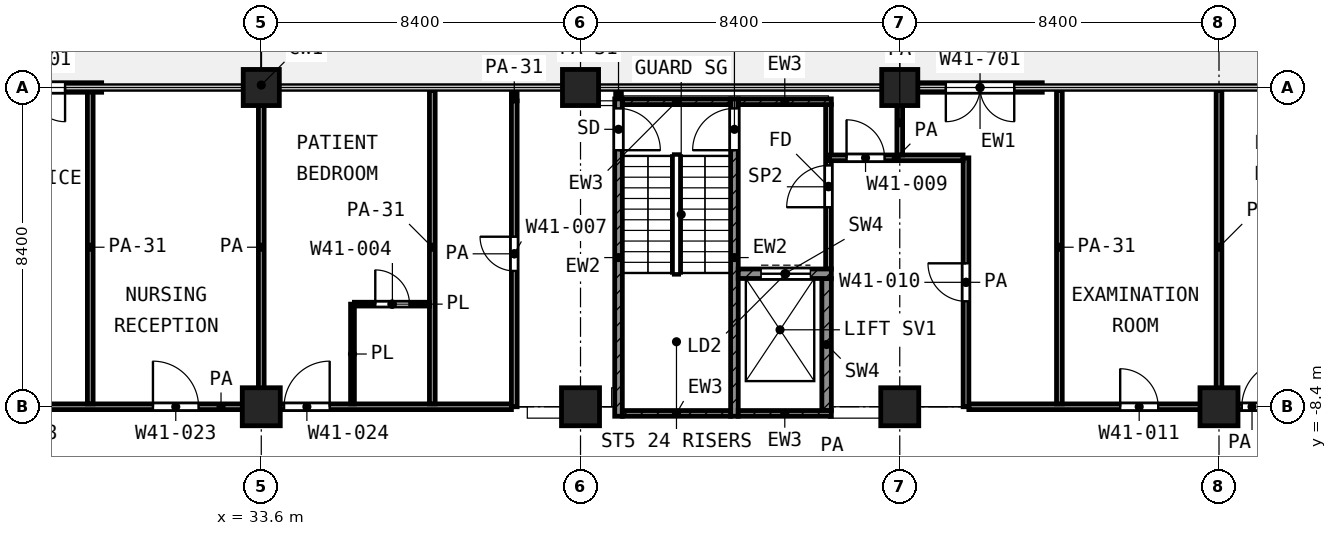
"""IFC4 building model, lengths in metres.
Left out: names, types, materials, properties, quantities, classifications, styles, units other than length and angle.
Written with IfcOpenShell. Run it as: python <this file> out.ifc"""

import sys

from ifc_helpers import new_model, si_unit, direction, frame, frame_2d, origin, origin_2d, place, context, subcontext, project, spatial, rectangle, extrude, element, fill, save


model = new_model("IFC4")
c1 = context("Model", 3, precision=1e-05, world=origin(), true_north=direction((0.0, 1.0)))
c2 = subcontext(c1, "Body", "Model", "MODEL_VIEW")
j1 = project(units=[si_unit("LENGTHUNIT", "METRE"), si_unit("PLANEANGLEUNIT", "RADIAN")], contexts=[c1])
p1 = place(None, origin())
s1 = spatial("IfcSite", under=j1, at=p1, CompositionType="ELEMENT")
p2 = place(p1, origin())
s2 = spatial("IfcBuilding", under=s1, at=p2, CompositionType="ELEMENT")
p3 = place(p2, frame((0.0, 0.0, 179.4)))
s3 = spatial("IfcBuildingStorey", under=s2, at=p3, CompositionType="ELEMENT", Elevation=179.4)
for number, where, z_axis, x_axis in (
    (1, (33.6, 0.0, 0.0), (0.0, 0.0, 1.0), (1.0, 0.0, 0.0)),
    (2, (42.0, 0.0, 0.0), (0.0, 0.0, 1.0), (1.0, 0.0, 0.0)),
    (3, (50.4, 0.0, 0.0), (0.0, 0.0, 1.0), (1.0, 0.0, 0.0)),
):
    element("IfcColumn", number, at=place(p3, frame(where, z_axis=z_axis, x_axis=x_axis)), inside=s3, PredefinedType="COLUMN", context=c2, shape_type="SweptSolid", body=[
        extrude(rectangle(XDim=0.95, YDim=0.95, at=origin_2d()), origin(), (0.0, 0.0, 1.0), 4.2),
    ])
for number, where, z_axis, x_axis in (
    (4, (33.6, -8.4, 0.0), (0.0, 0.0, 1.0), (1.0, 0.0, 0.0)),
    (5, (42.0, -8.4, 0.0), (0.0, 0.0, 1.0), (1.0, 0.0, 0.0)),
    (6, (50.4, -8.4, 0.0), (0.0, 0.0, 1.0), (1.0, 0.0, 0.0)),
    (7, (58.8, -8.4, 0.0), (0.0, 0.0, 1.0), (1.0, 0.0, 0.0)),
):
    element("IfcColumn", number, at=place(p3, frame(where, z_axis=z_axis, x_axis=x_axis)), inside=s3, PredefinedType="COLUMN", context=c2, shape_type="SweptSolid", body=[
        extrude(rectangle(XDim=1.0, YDim=1.0, at=origin_2d()), origin(), (0.0, 0.0, 1.0), 4.2),
    ])
p4 = place(p3, frame((54.15, 0.0, 0.0), z_axis=(0.0, 0.0, 1.0), x_axis=(-1.0, 0.0, 0.0)))
e8 = element("IfcWall", 8, at=p4, inside=s3, PredefinedType="SOLIDWALL", context=c2, shape_type="SweptSolid", body=[
    extrude(rectangle(XDim=3.275, YDim=0.25, at=frame_2d((1.637, 0.0))), origin(), (0.0, 0.0, 1.0), 2.58),
])
p5 = place(p4, frame((0.738, 0.0, 0.0)))
e9 = element("IfcOpeningElement", 9, at=p5, cuts=e8, PredefinedType="OPENING", context=c2, shape_type="SweptSolid", body=[
    extrude(rectangle(XDim=1.8, YDim=2.1, at=frame_2d((0.9, 1.05))), frame((0.0, 0.135, 0.0), z_axis=(0.0, -1.0, 0.0), x_axis=(1.0, 0.0, 0.0)), (0.0, 0.0, 1.0), 0.27),
])
p6 = place(p3, frame((29.4, 0.0, 0.0), z_axis=(0.0, 0.0, 1.0), x_axis=(-1.0, 0.0, 0.0)))
e10 = element("IfcWall", 10, at=p6, inside=s3, PredefinedType="SOLIDWALL", context=c2, shape_type="SweptSolid", body=[
    extrude(rectangle(XDim=3.725, YDim=0.25, at=frame_2d((1.862, 0.0))), origin(), (0.0, 0.0, 1.0), 2.58),
])
p7 = place(p6, frame((0.962, 0.0, 0.0)))
e11 = element("IfcOpeningElement", 11, at=p7, cuts=e10, PredefinedType="OPENING", context=c2, shape_type="SweptSolid", body=[
    extrude(rectangle(XDim=1.8, YDim=2.1, at=frame_2d((0.9, 1.05))), frame((0.0, 0.135, 0.0), z_axis=(0.0, -1.0, 0.0), x_axis=(1.0, 0.0, 0.0)), (0.0, 0.0, 1.0), 0.27),
])
p8 = place(p3, frame((43.0, -8.65, 0.0), z_axis=(0.0, 0.0, 1.0), x_axis=(0.0, 1.0, 0.0)))
e12 = element("IfcWall", 12, at=p8, inside=s3, PredefinedType="SHEAR", context=c2, shape_type="SweptSolid", body=[
    extrude(rectangle(XDim=8.35, YDim=0.2, at=frame_2d((4.175, 0.0))), origin(), (0.0, 0.0, 1.0), 3.6),
])
p9 = place(p8, frame((7.0, 0.0, 0.0)))
e13 = element("IfcOpeningElement", 13, at=p9, cuts=e12, PredefinedType="OPENING", context=c2, shape_type="SweptSolid", body=[
    extrude(rectangle(XDim=1.1, YDim=2.1, at=frame_2d((0.55, 1.05))), frame((0.0, 0.11, 0.0), z_axis=(0.0, -1.0, 0.0), x_axis=(1.0, 0.0, 0.0)), (0.0, 0.0, 1.0), 0.22),
])
p10 = place(p3, frame((46.05, -8.65, 0.0), z_axis=(0.0, 0.0, 1.0), x_axis=(0.0, 1.0, 0.0)))
e14 = element("IfcWall", 14, at=p10, inside=s3, PredefinedType="SHEAR", context=c2, shape_type="SweptSolid", body=[
    extrude(rectangle(XDim=8.35, YDim=0.2, at=frame_2d((4.175, 0.0))), origin(), (0.0, 0.0, 1.0), 3.6),
])
p11 = place(p10, frame((7.0, 0.0, 0.0)))
e15 = element("IfcOpeningElement", 15, at=p11, cuts=e14, PredefinedType="OPENING", context=c2, shape_type="SweptSolid", body=[
    extrude(rectangle(XDim=1.1, YDim=2.1, at=frame_2d((0.55, 1.05))), frame((0.0, 0.11, 0.0), z_axis=(0.0, -1.0, 0.0), x_axis=(1.0, 0.0, 0.0)), (0.0, 0.0, 1.0), 0.22),
])
p12 = place(p3, frame((43.1, -0.375, 0.0), z_axis=(0.0, 0.0, 1.0), x_axis=(1.0, 0.0, 0.0)))
e16 = element("IfcWall", 16, at=p12, inside=s3, PredefinedType="SHEAR", context=c2, shape_type="SweptSolid", body=[
    extrude(rectangle(XDim=2.85, YDim=0.15, at=frame_2d((1.425, 0.0))), origin(), (0.0, 0.0, 1.0), 3.6),
])
p13 = place(p3, frame((46.15, -0.375, 0.0), z_axis=(0.0, 0.0, 1.0), x_axis=(1.0, 0.0, 0.0)))
e17 = element("IfcWall", 17, at=p13, inside=s3, PredefinedType="SHEAR", context=c2, shape_type="SweptSolid", body=[
    extrude(rectangle(XDim=2.45, YDim=0.15, at=frame_2d((1.225, 0.0))), origin(), (0.0, 0.0, 1.0), 3.6),
])
p14 = place(p3, frame((43.1, -8.575, 0.0), z_axis=(0.0, 0.0, 1.0), x_axis=(1.0, 0.0, 0.0)))
e18 = element("IfcWall", 18, at=p14, inside=s3, PredefinedType="SHEAR", context=c2, shape_type="SweptSolid", body=[
    extrude(rectangle(XDim=2.85, YDim=0.15, at=frame_2d((1.425, 0.0))), origin(), (0.0, 0.0, 1.0), 3.6),
])
p15 = place(p3, frame((46.15, -8.575, 0.0), z_axis=(0.0, 0.0, 1.0), x_axis=(1.0, 0.0, 0.0)))
e19 = element("IfcWall", 19, at=p15, inside=s3, PredefinedType="SHEAR", context=c2, shape_type="SweptSolid", body=[
    extrude(rectangle(XDim=2.45, YDim=0.15, at=frame_2d((1.225, 0.0))), origin(), (0.0, 0.0, 1.0), 3.6),
])
p16 = place(p3, frame((46.15, -4.9, 0.0), z_axis=(0.0, 0.0, 1.0), x_axis=(1.0, 0.0, 0.0)))
e20 = element("IfcWall", 20, at=p16, inside=s3, PredefinedType="SHEAR", context=c2, shape_type="SweptSolid", body=[
    extrude(rectangle(XDim=2.45, YDim=0.25, at=frame_2d((1.225, 0.0))), origin(), (0.0, 0.0, 1.0), 3.6),
])
p17 = place(p16, frame((0.6, 0.0, 0.0)))
e21 = element("IfcOpeningElement", 21, at=p17, cuts=e20, PredefinedType="OPENING", context=c2, shape_type="SweptSolid", body=[
    extrude(rectangle(XDim=1.3, YDim=2.1, at=frame_2d((0.65, 1.05))), frame((0.0, 0.135, 0.0), z_axis=(0.0, -1.0, 0.0), x_axis=(1.0, 0.0, 0.0)), (0.0, 0.0, 1.0), 0.27),
])
p18 = place(p3, frame((48.475, -8.5, 0.0), z_axis=(0.0, 0.0, 1.0), x_axis=(0.0, 1.0, 0.0)))
e22 = element("IfcWall", 22, at=p18, inside=s3, PredefinedType="SHEAR", context=c2, shape_type="SweptSolid", body=[
    extrude(rectangle(XDim=3.475, YDim=0.25, at=frame_2d((1.738, 0.0))), origin(), (0.0, 0.0, 1.0), 3.6),
])
p19 = place(p3, frame((48.525, -4.775, 0.0), z_axis=(0.0, 0.0, 1.0), x_axis=(0.0, 1.0, 0.0)))
e23 = element("IfcWall", 23, at=p19, inside=s3, PredefinedType="PARTITIONING", context=c2, shape_type="SweptSolid", body=[
    extrude(rectangle(XDim=4.325, YDim=0.15, at=frame_2d((2.163, 0.0))), origin(), (0.0, 0.0, 1.0), 3.6),
])
p20 = place(p19, frame((1.625, 0.0, 0.0)))
e24 = element("IfcOpeningElement", 24, at=p20, cuts=e23, PredefinedType="OPENING", context=c2, shape_type="SweptSolid", body=[
    extrude(rectangle(XDim=1.1, YDim=2.1, at=frame_2d((0.55, 1.05))), frame((0.0, 0.085, 0.0), z_axis=(0.0, -1.0, 0.0), x_axis=(1.0, 0.0, 0.0)), (0.0, 0.0, 1.0), 0.17),
])
p21 = place(p3, frame((36.05, -5.7, 0.0), z_axis=(0.0, 0.0, 1.0), x_axis=(1.0, 0.0, 0.0)))
e25 = element("IfcWall", 25, at=p21, inside=s3, PredefinedType="PARTITIONING", context=c2, shape_type="SweptSolid", body=[
    extrude(rectangle(XDim=1.975, YDim=0.1, at=frame_2d((0.987, 0.0))), origin(), (0.0, 0.0, 1.0), 3.6),
])
p22 = place(p21, frame((0.55, 0.0, 0.0)))
e26 = element("IfcOpeningElement", 26, at=p22, cuts=e25, PredefinedType="OPENING", context=c2, shape_type="SweptSolid", body=[
    extrude(rectangle(XDim=0.9, YDim=2.1, at=frame_2d((0.45, 1.05))), frame((0.0, 0.06, 0.0), z_axis=(0.0, -1.0, 0.0), x_axis=(1.0, 0.0, 0.0)), (0.0, 0.0, 1.0), 0.12),
])
p23 = place(p3, frame((36.0, -8.325, 0.0), z_axis=(0.0, 0.0, 1.0), x_axis=(0.0, 1.0, 0.0)))
e27 = element("IfcWall", 27, at=p23, inside=s3, PredefinedType="PARTITIONING", context=c2, shape_type="SweptSolid", body=[
    extrude(rectangle(XDim=2.625, YDim=0.1, at=frame_2d((1.312, 0.0))), origin(), (0.0, 0.0, 1.0), 3.6),
])
p24 = place(p3, frame((24.9, -8.4, 0.0), z_axis=(0.0, 0.0, 1.0), x_axis=(1.0, 0.0, 0.0)))
e28 = element("IfcWall", 28, at=p24, inside=s3, PredefinedType="PARTITIONING", context=c2, shape_type="SweptSolid", body=[
    extrude(rectangle(XDim=15.282, YDim=0.15, at=frame_2d((7.641, 0.0))), origin(), (0.0, 0.0, 1.0), 3.6),
])
p25 = place(p24, frame((1.75, 0.0, 0.0)))
e29 = element("IfcOpeningElement", 29, at=p25, cuts=e28, PredefinedType="OPENING", context=c2, shape_type="SweptSolid", body=[
    extrude(rectangle(XDim=1.0, YDim=2.1, at=frame_2d((0.5, 1.05))), frame((0.0, 0.085, 0.0), z_axis=(0.0, -1.0, 0.0), x_axis=(1.0, 0.0, 0.0)), (0.0, 0.0, 1.0), 0.17),
])
p26 = place(p24, frame((5.85, 0.0, 0.0)))
e30 = element("IfcOpeningElement", 30, at=p26, cuts=e28, PredefinedType="OPENING", context=c2, shape_type="SweptSolid", body=[
    extrude(rectangle(XDim=1.2, YDim=2.1, at=frame_2d((0.6, 1.05))), frame((0.0, 0.085, 0.0), z_axis=(0.0, -1.0, 0.0), x_axis=(1.0, 0.0, 0.0)), (0.0, 0.0, 1.0), 0.17),
])
p27 = place(p24, frame((9.3, 0.0, 0.0)))
e31 = element("IfcOpeningElement", 31, at=p27, cuts=e28, PredefinedType="OPENING", context=c2, shape_type="SweptSolid", body=[
    extrude(rectangle(XDim=1.2, YDim=2.1, at=frame_2d((0.6, 1.05))), frame((0.0, 0.085, 0.0), z_axis=(0.0, -1.0, 0.0), x_axis=(1.0, 0.0, 0.0)), (0.0, 0.0, 1.0), 0.17),
])
p28 = place(p3, frame((52.218, -8.4, 0.0), z_axis=(0.0, 0.0, 1.0), x_axis=(1.0, 0.0, 0.0)))
e32 = element("IfcWall", 32, at=p28, inside=s3, PredefinedType="PARTITIONING", context=c2, shape_type="SweptSolid", body=[
    extrude(rectangle(XDim=14.902, YDim=0.15, at=frame_2d((7.451, 0.0))), origin(), (0.0, 0.0, 1.0), 3.6),
])
p29 = place(p28, frame((3.982, 0.0, 0.0)))
e33 = element("IfcOpeningElement", 33, at=p29, cuts=e32, PredefinedType="OPENING", context=c2, shape_type="SweptSolid", body=[
    extrude(rectangle(XDim=1.0, YDim=2.1, at=frame_2d((0.5, 1.05))), frame((0.0, 0.085, 0.0), z_axis=(0.0, -1.0, 0.0), x_axis=(1.0, 0.0, 0.0)), (0.0, 0.0, 1.0), 0.17),
])
p30 = place(p28, frame((7.182, 0.0, 0.0)))
e34 = element("IfcOpeningElement", 34, at=p30, cuts=e32, PredefinedType="OPENING", context=c2, shape_type="SweptSolid", body=[
    extrude(rectangle(XDim=1.2, YDim=2.1, at=frame_2d((0.6, 1.05))), frame((0.0, 0.085, 0.0), z_axis=(0.0, -1.0, 0.0), x_axis=(1.0, 0.0, 0.0)), (0.0, 0.0, 1.0), 0.17),
])
p31 = place(p28, frame((12.682, 0.0, 0.0)))
e35 = element("IfcOpeningElement", 35, at=p31, cuts=e32, PredefinedType="OPENING", context=c2, shape_type="SweptSolid", body=[
    extrude(rectangle(XDim=1.0, YDim=2.1, at=frame_2d((0.5, 1.05))), frame((0.0, 0.085, 0.0), z_axis=(0.0, -1.0, 0.0), x_axis=(1.0, 0.0, 0.0)), (0.0, 0.0, 1.0), 0.17),
])
p32 = place(p3, frame((48.55, -1.85, 0.0), z_axis=(0.0, 0.0, 1.0), x_axis=(1.0, 0.0, 0.0)))
e36 = element("IfcWall", 36, at=p32, inside=s3, PredefinedType="PARTITIONING", context=c2, shape_type="SweptSolid", body=[
    extrude(rectangle(XDim=3.516, YDim=0.15, at=frame_2d((1.758, 0.0))), origin(), (0.0, 0.0, 1.0), 3.6),
])
p33 = place(p32, frame((0.45, 0.0, 0.0)))
e37 = element("IfcOpeningElement", 37, at=p33, cuts=e36, PredefinedType="OPENING", context=c2, shape_type="SweptSolid", body=[
    extrude(rectangle(XDim=1.0, YDim=2.1, at=frame_2d((0.5, 1.05))), frame((0.0, 0.085, 0.0), z_axis=(0.0, -1.0, 0.0), x_axis=(1.0, 0.0, 0.0)), (0.0, 0.0, 1.0), 0.17),
])
p34 = place(p3, frame((29.1, -8.325, 0.0), z_axis=(0.0, 0.0, 1.0), x_axis=(0.0, 1.0, 0.0)))
e38 = element("IfcWall", 38, at=p34, inside=s3, PredefinedType="PARTITIONING", context=c2, shape_type="SweptSolid", body=[
    extrude(rectangle(XDim=8.245, YDim=0.15, at=frame_2d((4.123, 0.0))), origin(), (0.0, 0.0, 1.0), 2.7),
])
p35 = place(p3, frame((33.6, -8.325, 0.0), z_axis=(0.0, 0.0, 1.0), x_axis=(0.0, 1.0, 0.0)))
e39 = element("IfcWall", 39, at=p35, inside=s3, PredefinedType="PARTITIONING", context=c2, shape_type="SweptSolid", body=[
    extrude(rectangle(XDim=8.245, YDim=0.15, at=frame_2d((4.123, 0.0))), origin(), (0.0, 0.0, 1.0), 3.6),
])
p36 = place(p3, frame((38.1, -8.325, 0.0), z_axis=(0.0, 0.0, 1.0), x_axis=(0.0, 1.0, 0.0)))
e40 = element("IfcWall", 40, at=p36, inside=s3, PredefinedType="PARTITIONING", context=c2, shape_type="SweptSolid", body=[
    extrude(rectangle(XDim=8.245, YDim=0.15, at=frame_2d((4.123, 0.0))), origin(), (0.0, 0.0, 1.0), 2.7),
])
p37 = place(p3, frame((40.257, -8.4, 0.0), z_axis=(0.0, 0.0, 1.0), x_axis=(0.0, 1.0, 0.0)))
e41 = element("IfcWall", 41, at=p37, inside=s3, PredefinedType="PARTITIONING", context=c2, shape_type="SweptSolid", body=[
    extrude(rectangle(XDim=8.048, YDim=0.15, at=frame_2d((4.024, 0.0))), origin(), (0.0, 0.0, 1.0), 3.6),
])
p38 = place(p37, frame((3.574, 0.0, 0.0)))
e42 = element("IfcOpeningElement", 42, at=p38, cuts=e41, PredefinedType="OPENING", context=c2, shape_type="SweptSolid", body=[
    extrude(rectangle(XDim=0.9, YDim=2.1, at=frame_2d((0.45, 1.05))), frame((0.0, 0.085, 0.0), z_axis=(0.0, -1.0, 0.0), x_axis=(1.0, 0.0, 0.0)), (0.0, 0.0, 1.0), 0.17),
])
p39 = place(p3, frame((40.257, -0.35, 0.0), z_axis=(0.0, 0.0, 1.0), x_axis=(0.0, 1.0, 0.0)))
e43 = element("IfcWall", 43, at=p39, inside=s3, PredefinedType="PARTITIONING", context=c2, shape_type="SweptSolid", body=[
    extrude(rectangle(XDim=0.27, YDim=0.15, at=frame_2d((0.135, 0.0))), origin(), (0.0, 0.0, 1.0), 2.7),
])
p40 = place(p3, frame((43.0, -0.27, 0.0), z_axis=(0.0, 0.0, 1.0), x_axis=(0.0, 1.0, 0.0)))
e44 = element("IfcWall", 44, at=p40, inside=s3, PredefinedType="PARTITIONING", context=c2, shape_type="SweptSolid", body=[
    extrude(rectangle(XDim=0.19, YDim=0.15, at=frame_2d((0.095, 0.0))), origin(), (0.0, 0.0, 1.0), 2.7),
])
p41 = place(p3, frame((50.4, -1.775, 0.0), z_axis=(0.0, 0.0, 1.0), x_axis=(0.0, 1.0, 0.0)))
e45 = element("IfcWall", 45, at=p41, inside=s3, PredefinedType="PARTITIONING", context=c2, shape_type="SweptSolid", body=[
    extrude(rectangle(XDim=1.695, YDim=0.15, at=frame_2d((0.847, 0.0))), origin(), (0.0, 0.0, 1.0), 3.6),
])
p42 = place(p3, frame((52.143, -8.4, 0.0), z_axis=(0.0, 0.0, 1.0), x_axis=(0.0, 1.0, 0.0)))
e46 = element("IfcWall", 46, at=p42, inside=s3, PredefinedType="PARTITIONING", context=c2, shape_type="SweptSolid", body=[
    extrude(rectangle(XDim=6.549, YDim=0.15, at=frame_2d((3.274, 0.0))), origin(), (0.0, 0.0, 1.0), 3.6),
])
p43 = place(p42, frame((2.774, 0.0, 0.0)))
e47 = element("IfcOpeningElement", 47, at=p43, cuts=e46, PredefinedType="OPENING", context=c2, shape_type="SweptSolid", body=[
    extrude(rectangle(XDim=1.0, YDim=2.1, at=frame_2d((0.5, 1.05))), frame((0.0, 0.085, 0.0), z_axis=(0.0, -1.0, 0.0), x_axis=(1.0, 0.0, 0.0)), (0.0, 0.0, 1.0), 0.17),
])
for number, where, z_axis, x_axis in (
    (48, (54.6, -8.325, 0.0), (0.0, 0.0, 1.0), (0.0, 1.0, 0.0)),
    (49, (58.8, -8.325, 0.0), (0.0, 0.0, 1.0), (0.0, 1.0, 0.0)),
):
    element("IfcWall", number, at=place(p3, frame(where, z_axis=z_axis, x_axis=x_axis)), inside=s3, PredefinedType="PARTITIONING", context=c2, shape_type="SweptSolid", body=[
        extrude(rectangle(XDim=8.245, YDim=0.15, at=frame_2d((4.123, 0.0))), origin(), (0.0, 0.0, 1.0), 2.7),
    ])
p44 = place(p5, origin())
e50 = element("IfcDoor", 50, at=p44, inside=s3, OperationType="DOUBLE_DOOR_SINGLE_SWING", PredefinedType="DOOR", context=c2, shape_type="SweptSolid", body=[
    extrude(rectangle(XDim=1.8, YDim=2.1, at=frame_2d((0.9, 1.05))), frame((0.0, 0.025, 0.0), z_axis=(0.0, -1.0, 0.0), x_axis=(1.0, 0.0, 0.0)), (0.0, 0.0, 1.0), 0.05),
])
fill(e9, e50)
p45 = place(p7, origin())
e51 = element("IfcDoor", 51, at=p45, inside=s3, OperationType="DOUBLE_DOOR_SINGLE_SWING", PredefinedType="DOOR", context=c2, shape_type="SweptSolid", body=[
    extrude(rectangle(XDim=1.8, YDim=2.1, at=frame_2d((0.9, 1.05))), frame((0.0, 0.025, 0.0), z_axis=(0.0, -1.0, 0.0), x_axis=(1.0, 0.0, 0.0)), (0.0, 0.0, 1.0), 0.05),
])
fill(e11, e51)
p46 = place(p9, frame((1.1, 0.0, 0.0), z_axis=(0.0, 0.0, 1.0), x_axis=(-1.0, 0.0, 0.0)))
e52 = element("IfcDoor", 52, at=p46, inside=s3, OperationType="SINGLE_SWING_LEFT", PredefinedType="DOOR", context=c2, shape_type="SweptSolid", body=[
    extrude(rectangle(XDim=1.1, YDim=2.1, at=frame_2d((0.55, 1.05))), frame((0.0, 0.025, 0.0), z_axis=(0.0, -1.0, 0.0), x_axis=(1.0, 0.0, 0.0)), (0.0, 0.0, 1.0), 0.05),
])
fill(e13, e52)
p47 = place(p11, origin())
e53 = element("IfcDoor", 53, at=p47, inside=s3, OperationType="SINGLE_SWING_LEFT", PredefinedType="DOOR", context=c2, shape_type="SweptSolid", body=[
    extrude(rectangle(XDim=1.1, YDim=2.1, at=frame_2d((0.55, 1.05))), frame((0.0, 0.025, 0.0), z_axis=(0.0, -1.0, 0.0), x_axis=(1.0, 0.0, 0.0)), (0.0, 0.0, 1.0), 0.05),
])
fill(e15, e53)
p48 = place(p17, origin())
e54 = element("IfcDoor", 54, at=p48, inside=s3, OperationType="DOUBLE_DOOR_SLIDING", PredefinedType="DOOR", context=c2, shape_type="SweptSolid", body=[
    extrude(rectangle(XDim=1.3, YDim=2.1, at=frame_2d((0.65, 1.05))), frame((0.0, 0.025, 0.0), z_axis=(0.0, -1.0, 0.0), x_axis=(1.0, 0.0, 0.0)), (0.0, 0.0, 1.0), 0.05),
])
fill(e21, e54)
p49 = place(p20, origin())
e55 = element("IfcDoor", 55, at=p49, inside=s3, OperationType="SINGLE_SWING_LEFT", PredefinedType="DOOR", context=c2, shape_type="SweptSolid", body=[
    extrude(rectangle(XDim=1.1, YDim=2.1, at=frame_2d((0.55, 1.05))), frame((0.0, 0.025, 0.0), z_axis=(0.0, -1.0, 0.0), x_axis=(1.0, 0.0, 0.0)), (0.0, 0.0, 1.0), 0.05),
])
fill(e24, e55)
p50 = place(p26, origin())
e56 = element("IfcDoor", 56, at=p50, inside=s3, OperationType="SINGLE_SWING_LEFT", PredefinedType="DOOR", context=c2, shape_type="SweptSolid", body=[
    extrude(rectangle(XDim=1.2, YDim=2.1, at=frame_2d((0.6, 1.05))), frame((0.0, 0.025, 0.0), z_axis=(0.0, -1.0, 0.0), x_axis=(1.0, 0.0, 0.0)), (0.0, 0.0, 1.0), 0.05),
])
fill(e30, e56)
p51 = place(p27, origin())
e57 = element("IfcDoor", 57, at=p51, inside=s3, OperationType="SINGLE_SWING_RIGHT", PredefinedType="DOOR", context=c2, shape_type="SweptSolid", body=[
    extrude(rectangle(XDim=1.2, YDim=2.1, at=frame_2d((0.6, 1.05))), frame((0.0, 0.025, 0.0), z_axis=(0.0, -1.0, 0.0), x_axis=(1.0, 0.0, 0.0)), (0.0, 0.0, 1.0), 0.05),
])
fill(e31, e57)
p52 = place(p22, origin())
e58 = element("IfcDoor", 58, at=p52, inside=s3, OperationType="SINGLE_SWING_LEFT", PredefinedType="DOOR", context=c2, shape_type="SweptSolid", body=[
    extrude(rectangle(XDim=0.9, YDim=2.1, at=frame_2d((0.45, 1.05))), frame((0.0, 0.025, 0.0), z_axis=(0.0, -1.0, 0.0), x_axis=(1.0, 0.0, 0.0)), (0.0, 0.0, 1.0), 0.05),
])
fill(e26, e58)
p53 = place(p33, origin())
e59 = element("IfcDoor", 59, at=p53, inside=s3, OperationType="SINGLE_SWING_LEFT", PredefinedType="DOOR", context=c2, shape_type="SweptSolid", body=[
    extrude(rectangle(XDim=1.0, YDim=2.1, at=frame_2d((0.5, 1.05))), frame((0.0, 0.025, 0.0), z_axis=(0.0, -1.0, 0.0), x_axis=(1.0, 0.0, 0.0)), (0.0, 0.0, 1.0), 0.05),
])
fill(e37, e59)
p54 = place(p43, origin())
e60 = element("IfcDoor", 60, at=p54, inside=s3, OperationType="SINGLE_SWING_RIGHT", PredefinedType="DOOR", context=c2, shape_type="SweptSolid", body=[
    extrude(rectangle(XDim=1.0, YDim=2.1, at=frame_2d((0.5, 1.05))), frame((0.0, 0.025, 0.0), z_axis=(0.0, -1.0, 0.0), x_axis=(1.0, 0.0, 0.0)), (0.0, 0.0, 1.0), 0.05),
])
fill(e47, e60)
p55 = place(p29, origin())
e61 = element("IfcDoor", 61, at=p55, inside=s3, OperationType="SINGLE_SWING_LEFT", PredefinedType="DOOR", context=c2, shape_type="SweptSolid", body=[
    extrude(rectangle(XDim=1.0, YDim=2.1, at=frame_2d((0.5, 1.05))), frame((0.0, 0.025, 0.0), z_axis=(0.0, -1.0, 0.0), x_axis=(1.0, 0.0, 0.0)), (0.0, 0.0, 1.0), 0.05),
])
fill(e33, e61)
p56 = place(p30, origin())
e62 = element("IfcDoor", 62, at=p56, inside=s3, OperationType="SINGLE_SWING_RIGHT", PredefinedType="DOOR", context=c2, shape_type="SweptSolid", body=[
    extrude(rectangle(XDim=1.2, YDim=2.1, at=frame_2d((0.6, 1.05))), frame((0.0, 0.025, 0.0), z_axis=(0.0, -1.0, 0.0), x_axis=(1.0, 0.0, 0.0)), (0.0, 0.0, 1.0), 0.05),
])
fill(e34, e62)
p57 = place(p38, origin())
e63 = element("IfcDoor", 63, at=p57, inside=s3, OperationType="SINGLE_SWING_RIGHT", PredefinedType="DOOR", context=c2, shape_type="SweptSolid", body=[
    extrude(rectangle(XDim=0.9, YDim=2.1, at=frame_2d((0.45, 1.05))), frame((0.0, 0.025, 0.0), z_axis=(0.0, -1.0, 0.0), x_axis=(1.0, 0.0, 0.0)), (0.0, 0.0, 1.0), 0.05),
])
fill(e42, e63)
save(model, sys.argv[1])
